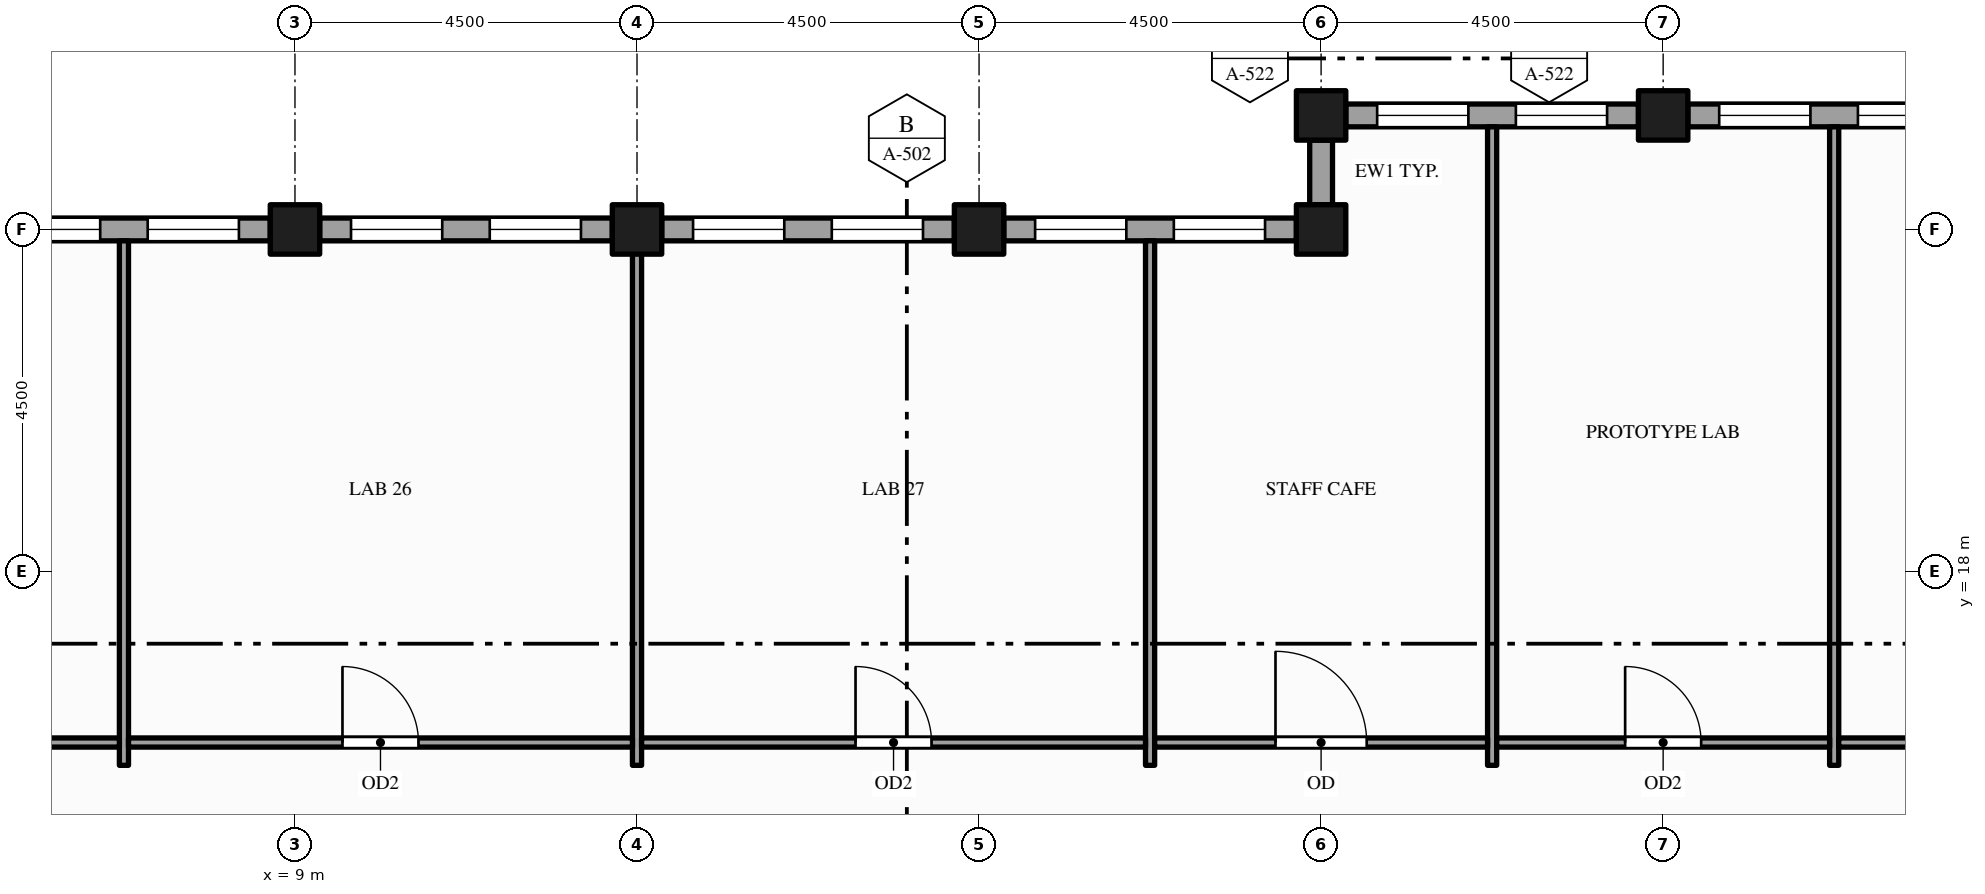
"""IFC4 building model, lengths in metres.
Left out: names, types, materials, properties, quantities, classifications, styles, units other than length and angle.
Written with IfcOpenShell. Run it as: python <this file> out.ifc"""

import sys

from ifc_helpers import new_model, si_unit, direction, frame, frame_2d, origin, origin_2d, place, context, subcontext, project, spatial, rectangle, hollow_rectangle, extrude, element, fill, save


model = new_model("IFC4")
c1 = context("Model", 3, precision=1e-05, world=origin(), true_north=direction((0.0, 1.0)))
c2 = subcontext(c1, "Body", "Model", "MODEL_VIEW")
j1 = project(units=[si_unit("LENGTHUNIT", "METRE"), si_unit("PLANEANGLEUNIT", "RADIAN")], contexts=[c1])
p1 = place(None, origin())
s1 = spatial("IfcSite", under=j1, at=p1, CompositionType="ELEMENT")
p2 = place(p1, origin())
s2 = spatial("IfcBuilding", under=s1, at=p2, CompositionType="ELEMENT")
p3 = place(p2, frame((0.0, 0.0, 281.0)))
s3 = spatial("IfcBuildingStorey", under=s2, at=p3, CompositionType="ELEMENT", Elevation=281.0)
for number, where, z_axis, x_axis in (
    (1, (9.0, 22.5, -0.15), (0.0, 0.0, 1.0), (1.0, 0.0, 0.0)),
    (2, (13.5, 22.5, -0.15), (0.0, 0.0, 1.0), (1.0, 0.0, 0.0)),
    (3, (18.0, 22.5, -0.15), (0.0, 0.0, 1.0), (1.0, 0.0, 0.0)),
    (4, (22.5, 22.5, -0.15), (0.0, 0.0, 1.0), (1.0, 0.0, 0.0)),
    (5, (22.5, 24.0, -0.15), (0.0, 0.0, 1.0), (1.0, 0.0, 0.0)),
    (6, (27.0, 24.0, -0.15), (0.0, 0.0, 1.0), (1.0, 0.0, 0.0)),
):
    element("IfcColumn", number, at=place(p3, frame(where, z_axis=z_axis, x_axis=x_axis)), inside=s3, PredefinedType="COLUMN", context=c2, shape_type="SweptSolid", body=[
        extrude(hollow_rectangle(XDim=0.65, YDim=0.65, WallThickness=0.032, at=origin_2d()), origin(), (0.0, 0.0, 1.0), 4.0),
    ])
p4 = place(p3, frame((31.175, 24.0, 0.0), z_axis=(0.0, 0.0, 1.0), x_axis=(-1.0, 0.0, 0.0)))
e7 = element("IfcWall", 7, at=p4, inside=s3, PredefinedType="STANDARD", context=c2, shape_type="SweptSolid", body=[
    extrude(rectangle(XDim=3.85, YDim=0.3, at=frame_2d((1.925, 0.0))), origin(), (0.0, 0.0, 1.0), 2.87),
])
p5 = place(p4, frame((0.413, 0.0, 0.9)))
e8 = element("IfcOpeningElement", 8, at=p5, cuts=e7, PredefinedType="OPENING", context=c2, shape_type="SweptSolid", body=[
    extrude(rectangle(XDim=1.2, YDim=1.75, at=frame_2d((0.6, 0.875))), frame((0.0, 0.16, 0.0), z_axis=(0.0, -1.0, 0.0), x_axis=(1.0, 0.0, 0.0)), (0.0, 0.0, 1.0), 0.32),
])
p6 = place(p4, frame((2.238, 0.0, 0.9)))
e9 = element("IfcOpeningElement", 9, at=p6, cuts=e7, PredefinedType="OPENING", context=c2, shape_type="SweptSolid", body=[
    extrude(rectangle(XDim=1.2, YDim=1.75, at=frame_2d((0.6, 0.875))), frame((0.0, 0.16, 0.0), z_axis=(0.0, -1.0, 0.0), x_axis=(1.0, 0.0, 0.0)), (0.0, 0.0, 1.0), 0.32),
])
p7 = place(p3, frame((26.675, 24.0, 0.0), z_axis=(0.0, 0.0, 1.0), x_axis=(-1.0, 0.0, 0.0)))
e10 = element("IfcWall", 10, at=p7, inside=s3, PredefinedType="STANDARD", context=c2, shape_type="SweptSolid", body=[
    extrude(rectangle(XDim=3.85, YDim=0.3, at=frame_2d((1.925, 0.0))), origin(), (0.0, 0.0, 1.0), 2.87),
])
p8 = place(p7, frame((0.413, 0.0, 0.9)))
e11 = element("IfcOpeningElement", 11, at=p8, cuts=e10, PredefinedType="OPENING", context=c2, shape_type="SweptSolid", body=[
    extrude(rectangle(XDim=1.2, YDim=1.75, at=frame_2d((0.6, 0.875))), frame((0.0, 0.16, 0.0), z_axis=(0.0, -1.0, 0.0), x_axis=(1.0, 0.0, 0.0)), (0.0, 0.0, 1.0), 0.32),
])
p9 = place(p7, frame((2.238, 0.0, 0.9)))
e12 = element("IfcOpeningElement", 12, at=p9, cuts=e10, PredefinedType="OPENING", context=c2, shape_type="SweptSolid", body=[
    extrude(rectangle(XDim=1.2, YDim=1.75, at=frame_2d((0.6, 0.875))), frame((0.0, 0.16, 0.0), z_axis=(0.0, -1.0, 0.0), x_axis=(1.0, 0.0, 0.0)), (0.0, 0.0, 1.0), 0.32),
])
p10 = place(p3, frame((22.5, 23.675, 0.0), z_axis=(0.0, 0.0, 1.0), x_axis=(0.0, -1.0, 0.0)))
e13 = element("IfcWall", 13, at=p10, inside=s3, PredefinedType="STANDARD", context=c2, shape_type="SweptSolid", body=[
    extrude(rectangle(XDim=0.85, YDim=0.3, at=frame_2d((0.425, 0.0))), origin(), (0.0, 0.0, 1.0), 3.162),
])
p11 = place(p3, frame((22.175, 22.5, 0.0), z_axis=(0.0, 0.0, 1.0), x_axis=(-1.0, 0.0, 0.0)))
e14 = element("IfcWall", 14, at=p11, inside=s3, PredefinedType="STANDARD", context=c2, shape_type="SweptSolid", body=[
    extrude(rectangle(XDim=3.85, YDim=0.3, at=frame_2d((1.925, 0.0))), origin(), (0.0, 0.0, 1.0), 2.87),
])
p12 = place(p11, frame((0.413, 0.0, 0.9)))
e15 = element("IfcOpeningElement", 15, at=p12, cuts=e14, PredefinedType="OPENING", context=c2, shape_type="SweptSolid", body=[
    extrude(rectangle(XDim=1.2, YDim=1.75, at=frame_2d((0.6, 0.875))), frame((0.0, 0.16, 0.0), z_axis=(0.0, -1.0, 0.0), x_axis=(1.0, 0.0, 0.0)), (0.0, 0.0, 1.0), 0.32),
])
p13 = place(p11, frame((2.238, 0.0, 0.9)))
e16 = element("IfcOpeningElement", 16, at=p13, cuts=e14, PredefinedType="OPENING", context=c2, shape_type="SweptSolid", body=[
    extrude(rectangle(XDim=1.2, YDim=1.75, at=frame_2d((0.6, 0.875))), frame((0.0, 0.16, 0.0), z_axis=(0.0, -1.0, 0.0), x_axis=(1.0, 0.0, 0.0)), (0.0, 0.0, 1.0), 0.32),
])
p14 = place(p3, frame((17.675, 22.5, 0.0), z_axis=(0.0, 0.0, 1.0), x_axis=(-1.0, 0.0, 0.0)))
e17 = element("IfcWall", 17, at=p14, inside=s3, PredefinedType="STANDARD", context=c2, shape_type="SweptSolid", body=[
    extrude(rectangle(XDim=3.85, YDim=0.3, at=frame_2d((1.925, 0.0))), origin(), (0.0, 0.0, 1.0), 2.87),
])
p15 = place(p14, frame((0.413, 0.0, 0.9)))
e18 = element("IfcOpeningElement", 18, at=p15, cuts=e17, PredefinedType="OPENING", context=c2, shape_type="SweptSolid", body=[
    extrude(rectangle(XDim=1.2, YDim=1.75, at=frame_2d((0.6, 0.875))), frame((0.0, 0.16, 0.0), z_axis=(0.0, -1.0, 0.0), x_axis=(1.0, 0.0, 0.0)), (0.0, 0.0, 1.0), 0.32),
])
p16 = place(p14, frame((2.238, 0.0, 0.9)))
e19 = element("IfcOpeningElement", 19, at=p16, cuts=e17, PredefinedType="OPENING", context=c2, shape_type="SweptSolid", body=[
    extrude(rectangle(XDim=1.2, YDim=1.75, at=frame_2d((0.6, 0.875))), frame((0.0, 0.16, 0.0), z_axis=(0.0, -1.0, 0.0), x_axis=(1.0, 0.0, 0.0)), (0.0, 0.0, 1.0), 0.32),
])
p17 = place(p3, frame((13.175, 22.5, 0.0), z_axis=(0.0, 0.0, 1.0), x_axis=(-1.0, 0.0, 0.0)))
e20 = element("IfcWall", 20, at=p17, inside=s3, PredefinedType="STANDARD", context=c2, shape_type="SweptSolid", body=[
    extrude(rectangle(XDim=3.85, YDim=0.3, at=frame_2d((1.925, 0.0))), origin(), (0.0, 0.0, 1.0), 2.87),
])
p18 = place(p17, frame((0.413, 0.0, 0.9)))
e21 = element("IfcOpeningElement", 21, at=p18, cuts=e20, PredefinedType="OPENING", context=c2, shape_type="SweptSolid", body=[
    extrude(rectangle(XDim=1.2, YDim=1.75, at=frame_2d((0.6, 0.875))), frame((0.0, 0.16, 0.0), z_axis=(0.0, -1.0, 0.0), x_axis=(1.0, 0.0, 0.0)), (0.0, 0.0, 1.0), 0.32),
])
p19 = place(p17, frame((2.238, 0.0, 0.9)))
e22 = element("IfcOpeningElement", 22, at=p19, cuts=e20, PredefinedType="OPENING", context=c2, shape_type="SweptSolid", body=[
    extrude(rectangle(XDim=1.2, YDim=1.75, at=frame_2d((0.6, 0.875))), frame((0.0, 0.16, 0.0), z_axis=(0.0, -1.0, 0.0), x_axis=(1.0, 0.0, 0.0)), (0.0, 0.0, 1.0), 0.32),
])
p20 = place(p3, frame((8.675, 22.5, 0.0), z_axis=(0.0, 0.0, 1.0), x_axis=(-1.0, 0.0, 0.0)))
e23 = element("IfcWall", 23, at=p20, inside=s3, PredefinedType="STANDARD", context=c2, shape_type="SweptSolid", body=[
    extrude(rectangle(XDim=3.85, YDim=0.3, at=frame_2d((1.925, 0.0))), origin(), (0.0, 0.0, 1.0), 2.87),
])
p21 = place(p20, frame((0.413, 0.0, 0.9)))
e24 = element("IfcOpeningElement", 24, at=p21, cuts=e23, PredefinedType="OPENING", context=c2, shape_type="SweptSolid", body=[
    extrude(rectangle(XDim=1.2, YDim=1.75, at=frame_2d((0.6, 0.875))), frame((0.0, 0.16, 0.0), z_axis=(0.0, -1.0, 0.0), x_axis=(1.0, 0.0, 0.0)), (0.0, 0.0, 1.0), 0.32),
])
p22 = place(p20, frame((2.238, 0.0, 0.9)))
e25 = element("IfcOpeningElement", 25, at=p22, cuts=e23, PredefinedType="OPENING", context=c2, shape_type="SweptSolid", body=[
    extrude(rectangle(XDim=1.2, YDim=1.75, at=frame_2d((0.6, 0.875))), frame((0.0, 0.16, 0.0), z_axis=(0.0, -1.0, 0.0), x_axis=(1.0, 0.0, 0.0)), (0.0, 0.0, 1.0), 0.32),
])
for number, where, z_axis, x_axis in (
    (26, (6.75, 15.45, 0.0), (0.0, 0.0, 1.0), (0.0, 1.0, 0.0)),
    (27, (13.5, 15.45, 0.0), (0.0, 0.0, 1.0), (0.0, 1.0, 0.0)),
    (28, (20.25, 15.45, 0.0), (0.0, 0.0, 1.0), (0.0, 1.0, 0.0)),
):
    element("IfcWall", number, at=place(p3, frame(where, z_axis=z_axis, x_axis=x_axis)), inside=s3, PredefinedType="PARTITIONING", context=c2, shape_type="SweptSolid", body=[
        extrude(rectangle(XDim=6.9, YDim=0.12, at=frame_2d((3.45, 0.0))), origin(), (0.0, 0.0, 1.0), 2.87),
    ])
for number, where, z_axis, x_axis in (
    (29, (24.75, 15.45, 0.0), (0.0, 0.0, 1.0), (0.0, 1.0, 0.0)),
    (30, (29.25, 15.45, 0.0), (0.0, 0.0, 1.0), (0.0, 1.0, 0.0)),
):
    element("IfcWall", number, at=place(p3, frame(where, z_axis=z_axis, x_axis=x_axis)), inside=s3, PredefinedType="PARTITIONING", context=c2, shape_type="SweptSolid", body=[
        extrude(rectangle(XDim=8.4, YDim=0.12, at=frame_2d((4.2, 0.0))), origin(), (0.0, 0.0, 1.0), 2.87),
    ])
p23 = place(p3, frame((0.15, 15.75, 0.0), z_axis=(0.0, 0.0, 1.0), x_axis=(1.0, 0.0, 0.0)))
e31 = element("IfcWall", 31, at=p23, inside=s3, PredefinedType="PARTITIONING", context=c2, shape_type="SweptSolid", body=[
    extrude(rectangle(XDim=6.54, YDim=0.12, at=frame_2d((3.27, 0.0))), origin(), (0.0, 0.0, 1.0), 2.87),
])
p24 = place(p23, frame((2.78, 0.0, 0.0)))
e32 = element("IfcOpeningElement", 32, at=p24, cuts=e31, PredefinedType="OPENING", context=c2, shape_type="SweptSolid", body=[
    extrude(rectangle(XDim=1.0, YDim=2.1, at=frame_2d((0.5, 1.05))), frame((0.0, 0.07, 0.0), z_axis=(0.0, -1.0, 0.0), x_axis=(1.0, 0.0, 0.0)), (0.0, 0.0, 1.0), 0.14),
])
p25 = place(p3, frame((6.81, 15.75, 0.0), z_axis=(0.0, 0.0, 1.0), x_axis=(1.0, 0.0, 0.0)))
e33 = element("IfcWall", 33, at=p25, inside=s3, PredefinedType="PARTITIONING", context=c2, shape_type="SweptSolid", body=[
    extrude(rectangle(XDim=6.63, YDim=0.12, at=frame_2d((3.315, 0.0))), origin(), (0.0, 0.0, 1.0), 2.87),
])
p26 = place(p25, frame((2.815, 0.0, 0.0)))
e34 = element("IfcOpeningElement", 34, at=p26, cuts=e33, PredefinedType="OPENING", context=c2, shape_type="SweptSolid", body=[
    extrude(rectangle(XDim=1.0, YDim=2.1, at=frame_2d((0.5, 1.05))), frame((0.0, 0.07, 0.0), z_axis=(0.0, -1.0, 0.0), x_axis=(1.0, 0.0, 0.0)), (0.0, 0.0, 1.0), 0.14),
])
p27 = place(p3, frame((13.56, 15.75, 0.0), z_axis=(0.0, 0.0, 1.0), x_axis=(1.0, 0.0, 0.0)))
e35 = element("IfcWall", 35, at=p27, inside=s3, PredefinedType="PARTITIONING", context=c2, shape_type="SweptSolid", body=[
    extrude(rectangle(XDim=6.63, YDim=0.12, at=frame_2d((3.315, 0.0))), origin(), (0.0, 0.0, 1.0), 2.87),
])
p28 = place(p27, frame((2.815, 0.0, 0.0)))
e36 = element("IfcOpeningElement", 36, at=p28, cuts=e35, PredefinedType="OPENING", context=c2, shape_type="SweptSolid", body=[
    extrude(rectangle(XDim=1.0, YDim=2.1, at=frame_2d((0.5, 1.05))), frame((0.0, 0.07, 0.0), z_axis=(0.0, -1.0, 0.0), x_axis=(1.0, 0.0, 0.0)), (0.0, 0.0, 1.0), 0.14),
])
p29 = place(p3, frame((20.31, 15.75, 0.0), z_axis=(0.0, 0.0, 1.0), x_axis=(1.0, 0.0, 0.0)))
e37 = element("IfcWall", 37, at=p29, inside=s3, PredefinedType="PARTITIONING", context=c2, shape_type="SweptSolid", body=[
    extrude(rectangle(XDim=4.38, YDim=0.12, at=frame_2d((2.19, 0.0))), origin(), (0.0, 0.0, 1.0), 2.87),
])
p30 = place(p29, frame((1.59, 0.0, 0.0)))
e38 = element("IfcOpeningElement", 38, at=p30, cuts=e37, PredefinedType="OPENING", context=c2, shape_type="SweptSolid", body=[
    extrude(rectangle(XDim=1.2, YDim=2.1, at=frame_2d((0.6, 1.05))), frame((0.0, 0.07, 0.0), z_axis=(0.0, -1.0, 0.0), x_axis=(1.0, 0.0, 0.0)), (0.0, 0.0, 1.0), 0.14),
])
p31 = place(p3, frame((24.81, 15.75, 0.0), z_axis=(0.0, 0.0, 1.0), x_axis=(1.0, 0.0, 0.0)))
e39 = element("IfcWall", 39, at=p31, inside=s3, PredefinedType="PARTITIONING", context=c2, shape_type="SweptSolid", body=[
    extrude(rectangle(XDim=4.38, YDim=0.12, at=frame_2d((2.19, 0.0))), origin(), (0.0, 0.0, 1.0), 2.87),
])
p32 = place(p31, frame((1.69, 0.0, 0.0)))
e40 = element("IfcOpeningElement", 40, at=p32, cuts=e39, PredefinedType="OPENING", context=c2, shape_type="SweptSolid", body=[
    extrude(rectangle(XDim=1.0, YDim=2.1, at=frame_2d((0.5, 1.05))), frame((0.0, 0.07, 0.0), z_axis=(0.0, -1.0, 0.0), x_axis=(1.0, 0.0, 0.0)), (0.0, 0.0, 1.0), 0.14),
])
p33 = place(p3, frame((29.31, 15.75, 0.0), z_axis=(0.0, 0.0, 1.0), x_axis=(1.0, 0.0, 0.0)))
e41 = element("IfcWall", 41, at=p33, inside=s3, PredefinedType="PARTITIONING", context=c2, shape_type="SweptSolid", body=[
    extrude(rectangle(XDim=11.13, YDim=0.12, at=frame_2d((5.565, 0.0))), origin(), (0.0, 0.0, 1.0), 2.87),
])
p34 = place(p33, frame((5.065, 0.0, 0.0)))
e42 = element("IfcOpeningElement", 42, at=p34, cuts=e41, PredefinedType="OPENING", context=c2, shape_type="SweptSolid", body=[
    extrude(rectangle(XDim=1.0, YDim=2.1, at=frame_2d((0.5, 1.05))), frame((0.0, 0.07, 0.0), z_axis=(0.0, -1.0, 0.0), x_axis=(1.0, 0.0, 0.0)), (0.0, 0.0, 1.0), 0.14),
])
p35 = place(p5, origin())
e43 = element("IfcWindow", 43, at=p35, inside=s3, PartitioningType="SINGLE_PANEL", PredefinedType="WINDOW", context=c2, shape_type="SweptSolid", body=[
    extrude(rectangle(XDim=1.2, YDim=1.75, at=frame_2d((0.6, 0.875))), frame((0.0, 0.03, 0.0), z_axis=(0.0, -1.0, 0.0), x_axis=(1.0, 0.0, 0.0)), (0.0, 0.0, 1.0), 0.06),
])
fill(e8, e43)
p36 = place(p6, origin())
e44 = element("IfcWindow", 44, at=p36, inside=s3, PartitioningType="SINGLE_PANEL", PredefinedType="WINDOW", context=c2, shape_type="SweptSolid", body=[
    extrude(rectangle(XDim=1.2, YDim=1.75, at=frame_2d((0.6, 0.875))), frame((0.0, 0.03, 0.0), z_axis=(0.0, -1.0, 0.0), x_axis=(1.0, 0.0, 0.0)), (0.0, 0.0, 1.0), 0.06),
])
fill(e9, e44)
p37 = place(p8, origin())
e45 = element("IfcWindow", 45, at=p37, inside=s3, PartitioningType="SINGLE_PANEL", PredefinedType="WINDOW", context=c2, shape_type="SweptSolid", body=[
    extrude(rectangle(XDim=1.2, YDim=1.75, at=frame_2d((0.6, 0.875))), frame((0.0, 0.03, 0.0), z_axis=(0.0, -1.0, 0.0), x_axis=(1.0, 0.0, 0.0)), (0.0, 0.0, 1.0), 0.06),
])
fill(e11, e45)
p38 = place(p9, origin())
e46 = element("IfcWindow", 46, at=p38, inside=s3, PartitioningType="SINGLE_PANEL", PredefinedType="WINDOW", context=c2, shape_type="SweptSolid", body=[
    extrude(rectangle(XDim=1.2, YDim=1.75, at=frame_2d((0.6, 0.875))), frame((0.0, 0.03, 0.0), z_axis=(0.0, -1.0, 0.0), x_axis=(1.0, 0.0, 0.0)), (0.0, 0.0, 1.0), 0.06),
])
fill(e12, e46)
p39 = place(p12, origin())
e47 = element("IfcWindow", 47, at=p39, inside=s3, PartitioningType="SINGLE_PANEL", PredefinedType="WINDOW", context=c2, shape_type="SweptSolid", body=[
    extrude(rectangle(XDim=1.2, YDim=1.75, at=frame_2d((0.6, 0.875))), frame((0.0, 0.03, 0.0), z_axis=(0.0, -1.0, 0.0), x_axis=(1.0, 0.0, 0.0)), (0.0, 0.0, 1.0), 0.06),
])
fill(e15, e47)
p40 = place(p13, origin())
e48 = element("IfcWindow", 48, at=p40, inside=s3, PartitioningType="SINGLE_PANEL", PredefinedType="WINDOW", context=c2, shape_type="SweptSolid", body=[
    extrude(rectangle(XDim=1.2, YDim=1.75, at=frame_2d((0.6, 0.875))), frame((0.0, 0.03, 0.0), z_axis=(0.0, -1.0, 0.0), x_axis=(1.0, 0.0, 0.0)), (0.0, 0.0, 1.0), 0.06),
])
fill(e16, e48)
p41 = place(p15, origin())
e49 = element("IfcWindow", 49, at=p41, inside=s3, PartitioningType="SINGLE_PANEL", PredefinedType="WINDOW", context=c2, shape_type="SweptSolid", body=[
    extrude(rectangle(XDim=1.2, YDim=1.75, at=frame_2d((0.6, 0.875))), frame((0.0, 0.03, 0.0), z_axis=(0.0, -1.0, 0.0), x_axis=(1.0, 0.0, 0.0)), (0.0, 0.0, 1.0), 0.06),
])
fill(e18, e49)
p42 = place(p16, origin())
e50 = element("IfcWindow", 50, at=p42, inside=s3, PartitioningType="SINGLE_PANEL", PredefinedType="WINDOW", context=c2, shape_type="SweptSolid", body=[
    extrude(rectangle(XDim=1.2, YDim=1.75, at=frame_2d((0.6, 0.875))), frame((0.0, 0.03, 0.0), z_axis=(0.0, -1.0, 0.0), x_axis=(1.0, 0.0, 0.0)), (0.0, 0.0, 1.0), 0.06),
])
fill(e19, e50)
p43 = place(p18, origin())
e51 = element("IfcWindow", 51, at=p43, inside=s3, PartitioningType="SINGLE_PANEL", PredefinedType="WINDOW", context=c2, shape_type="SweptSolid", body=[
    extrude(rectangle(XDim=1.2, YDim=1.75, at=frame_2d((0.6, 0.875))), frame((0.0, 0.03, 0.0), z_axis=(0.0, -1.0, 0.0), x_axis=(1.0, 0.0, 0.0)), (0.0, 0.0, 1.0), 0.06),
])
fill(e21, e51)
p44 = place(p19, origin())
e52 = element("IfcWindow", 52, at=p44, inside=s3, PartitioningType="SINGLE_PANEL", PredefinedType="WINDOW", context=c2, shape_type="SweptSolid", body=[
    extrude(rectangle(XDim=1.2, YDim=1.75, at=frame_2d((0.6, 0.875))), frame((0.0, 0.03, 0.0), z_axis=(0.0, -1.0, 0.0), x_axis=(1.0, 0.0, 0.0)), (0.0, 0.0, 1.0), 0.06),
])
fill(e22, e52)
p45 = place(p21, origin())
e53 = element("IfcWindow", 53, at=p45, inside=s3, PartitioningType="SINGLE_PANEL", PredefinedType="WINDOW", context=c2, shape_type="SweptSolid", body=[
    extrude(rectangle(XDim=1.2, YDim=1.75, at=frame_2d((0.6, 0.875))), frame((0.0, 0.03, 0.0), z_axis=(0.0, -1.0, 0.0), x_axis=(1.0, 0.0, 0.0)), (0.0, 0.0, 1.0), 0.06),
])
fill(e24, e53)
p46 = place(p22, origin())
e54 = element("IfcWindow", 54, at=p46, inside=s3, PartitioningType="SINGLE_PANEL", PredefinedType="WINDOW", context=c2, shape_type="SweptSolid", body=[
    extrude(rectangle(XDim=1.2, YDim=1.75, at=frame_2d((0.6, 0.875))), frame((0.0, 0.03, 0.0), z_axis=(0.0, -1.0, 0.0), x_axis=(1.0, 0.0, 0.0)), (0.0, 0.0, 1.0), 0.06),
])
fill(e25, e54)
p47 = place(p26, origin())
e55 = element("IfcDoor", 55, at=p47, inside=s3, OperationType="SINGLE_SWING_LEFT", PredefinedType="DOOR", context=c2, shape_type="SweptSolid", body=[
    extrude(rectangle(XDim=1.0, YDim=2.1, at=frame_2d((0.5, 1.05))), frame((0.0, 0.025, 0.0), z_axis=(0.0, -1.0, 0.0), x_axis=(1.0, 0.0, 0.0)), (0.0, 0.0, 1.0), 0.05),
])
fill(e34, e55)
p48 = place(p28, origin())
e56 = element("IfcDoor", 56, at=p48, inside=s3, OperationType="SINGLE_SWING_LEFT", PredefinedType="DOOR", context=c2, shape_type="SweptSolid", body=[
    extrude(rectangle(XDim=1.0, YDim=2.1, at=frame_2d((0.5, 1.05))), frame((0.0, 0.025, 0.0), z_axis=(0.0, -1.0, 0.0), x_axis=(1.0, 0.0, 0.0)), (0.0, 0.0, 1.0), 0.05),
])
fill(e36, e56)
p49 = place(p30, origin())
e57 = element("IfcDoor", 57, at=p49, inside=s3, OperationType="SINGLE_SWING_LEFT", PredefinedType="DOOR", context=c2, shape_type="SweptSolid", body=[
    extrude(rectangle(XDim=1.2, YDim=2.1, at=frame_2d((0.6, 1.05))), frame((0.0, 0.025, 0.0), z_axis=(0.0, -1.0, 0.0), x_axis=(1.0, 0.0, 0.0)), (0.0, 0.0, 1.0), 0.05),
])
fill(e38, e57)
p50 = place(p32, origin())
e58 = element("IfcDoor", 58, at=p50, inside=s3, OperationType="SINGLE_SWING_LEFT", PredefinedType="DOOR", context=c2, shape_type="SweptSolid", body=[
    extrude(rectangle(XDim=1.0, YDim=2.1, at=frame_2d((0.5, 1.05))), frame((0.0, 0.025, 0.0), z_axis=(0.0, -1.0, 0.0), x_axis=(1.0, 0.0, 0.0)), (0.0, 0.0, 1.0), 0.05),
])
fill(e40, e58)
save(model, sys.argv[1])
